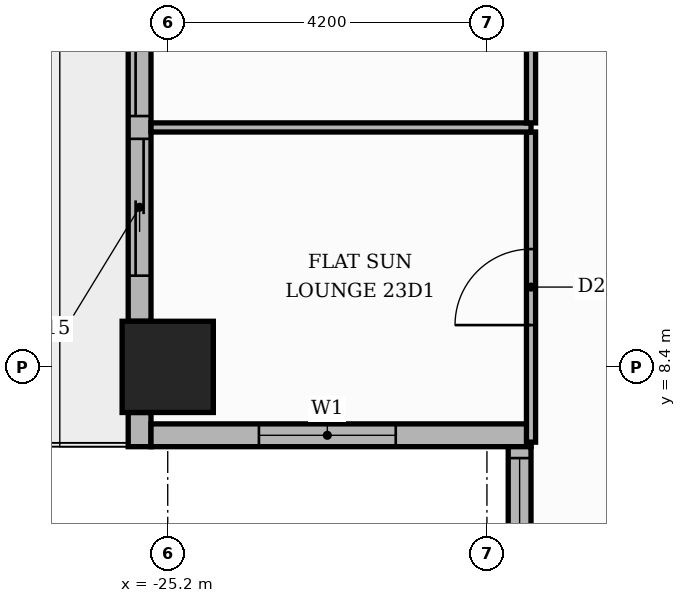
"""IFC4 building model, lengths in metres.
Left out: names, types, materials, properties, quantities, classifications, styles, units other than length and angle.
Written with IfcOpenShell. Run it as: python <this file> out.ifc"""

import sys

from ifc_helpers import new_model, si_unit, direction, frame, frame_2d, origin, origin_2d, place, context, subcontext, project, spatial, rectangle, extrude, element, fill, save


model = new_model("IFC4")
c1 = context("Model", 3, precision=1e-05, world=origin(), true_north=direction((0.0, 1.0)))
c2 = subcontext(c1, "Body", "Model", "MODEL_VIEW")
j1 = project(units=[si_unit("LENGTHUNIT", "METRE"), si_unit("PLANEANGLEUNIT", "RADIAN")], contexts=[c1])
p1 = place(None, origin())
s1 = spatial("IfcSite", under=j1, at=p1, CompositionType="ELEMENT")
p2 = place(p1, origin())
s2 = spatial("IfcBuilding", under=s1, at=p2, CompositionType="ELEMENT")
p3 = place(p2, frame((0.0, 0.0, 98.7)))
s3 = spatial("IfcBuildingStorey", under=s2, at=p3, CompositionType="ELEMENT", Elevation=98.7)
p4 = place(p3, frame((-25.2, 8.4, 0.0), z_axis=(0.0, 0.0, 1.0), x_axis=(1.0, 0.0, 0.0)))
e1 = element("IfcColumn", 1, at=p4, inside=s3, PredefinedType="COLUMN", context=c2, shape_type="SweptSolid", body=[
    extrude(rectangle(XDim=1.2, YDim=1.2, at=origin_2d()), origin(), (0.0, 0.0, 1.0), 3.9),
])
p5 = place(p3, frame((-25.57, 16.2, 0.0), z_axis=(0.0, 0.0, 1.0), x_axis=(0.0, -1.0, 0.0)))
e2 = element("IfcWall", 2, at=p5, inside=s3, PredefinedType="STANDARD", context=c2, shape_type="SweptSolid", body=[
    extrude(rectangle(XDim=7.2, YDim=0.3, at=frame_2d((3.6, 0.0))), origin(), (0.0, 0.0, 1.0), 3.48),
])
p6 = place(p5, frame((0.6, 0.0, 0.0)))
e3 = element("IfcOpeningElement", 3, at=p6, cuts=e2, PredefinedType="OPENING", context=c2, shape_type="SweptSolid", body=[
    extrude(rectangle(XDim=3.9, YDim=2.4, at=frame_2d((1.95, 1.2))), frame((0.0, 0.16, 0.0), z_axis=(0.0, -1.0, 0.0), x_axis=(1.0, 0.0, 0.0)), (0.0, 0.0, 1.0), 0.32),
])
p7 = place(p5, frame((4.8, 0.0, 0.0)))
e4 = element("IfcOpeningElement", 4, at=p7, cuts=e2, PredefinedType="OPENING", context=c2, shape_type="SweptSolid", body=[
    extrude(rectangle(XDim=1.8, YDim=2.4, at=frame_2d((0.9, 1.2))), frame((0.0, 0.16, 0.0), z_axis=(0.0, -1.0, 0.0), x_axis=(1.0, 0.0, 0.0)), (0.0, 0.0, 1.0), 0.32),
])
p8 = place(p3, frame((-25.57, 7.8, 0.0), z_axis=(0.0, 0.0, 1.0), x_axis=(0.0, -1.0, 0.0)))
e5 = element("IfcWall", 5, at=p8, inside=s3, PredefinedType="STANDARD", context=c2, shape_type="SweptSolid", body=[
    extrude(rectangle(XDim=0.45, YDim=0.3, at=frame_2d((0.225, 0.0))), origin(), (0.0, 0.0, 1.0), 3.48),
])
p9 = place(p3, frame((-25.42, 7.5, 0.0), z_axis=(0.0, 0.0, 1.0), x_axis=(1.0, 0.0, 0.0)))
e6 = element("IfcWall", 6, at=p9, inside=s3, PredefinedType="STANDARD", context=c2, shape_type="SweptSolid", body=[
    extrude(rectangle(XDim=5.0, YDim=0.3, at=frame_2d((2.5, 0.0))), origin(), (0.0, 0.0, 1.0), 3.48),
])
p10 = place(p9, frame((1.42, 0.0, 0.9)))
e7 = element("IfcOpeningElement", 7, at=p10, cuts=e6, PredefinedType="OPENING", context=c2, shape_type="SweptSolid", body=[
    extrude(rectangle(XDim=1.8, YDim=2.1, at=frame_2d((0.9, 1.05))), frame((0.0, 0.16, 0.0), z_axis=(0.0, -1.0, 0.0), x_axis=(1.0, 0.0, 0.0)), (0.0, 0.0, 1.0), 0.32),
])
p11 = place(p3, frame((-20.57, 7.35, 0.0), z_axis=(0.0, 0.0, 1.0), x_axis=(0.0, -1.0, 0.0)))
e8 = element("IfcWall", 8, at=p11, inside=s3, PredefinedType="STANDARD", context=c2, shape_type="SweptSolid", body=[
    extrude(rectangle(XDim=15.0, YDim=0.3, at=frame_2d((7.5, 0.0))), origin(), (0.0, 0.0, 1.0), 3.48),
])
p12 = place(p11, frame((0.15, 0.0, 0.9)))
e9 = element("IfcOpeningElement", 9, at=p12, cuts=e8, PredefinedType="OPENING", context=c2, shape_type="SweptSolid", body=[
    extrude(rectangle(XDim=6.0, YDim=2.1, at=frame_2d((3.0, 1.05))), frame((0.0, 0.16, 0.0), z_axis=(0.0, -1.0, 0.0), x_axis=(1.0, 0.0, 0.0)), (0.0, 0.0, 1.0), 0.32),
])
p13 = place(p11, frame((6.45, 0.0, 0.9)))
e10 = element("IfcOpeningElement", 10, at=p13, cuts=e8, PredefinedType="OPENING", context=c2, shape_type="SweptSolid", body=[
    extrude(rectangle(XDim=6.0, YDim=2.1, at=frame_2d((3.0, 1.05))), frame((0.0, 0.16, 0.0), z_axis=(0.0, -1.0, 0.0), x_axis=(1.0, 0.0, 0.0)), (0.0, 0.0, 1.0), 0.32),
])
p14 = place(p11, frame((12.75, 0.0, 0.9)))
e11 = element("IfcOpeningElement", 11, at=p14, cuts=e8, PredefinedType="OPENING", context=c2, shape_type="SweptSolid", body=[
    extrude(rectangle(XDim=1.8, YDim=2.1, at=frame_2d((0.9, 1.05))), frame((0.0, 0.16, 0.0), z_axis=(0.0, -1.0, 0.0), x_axis=(1.0, 0.0, 0.0)), (0.0, 0.0, 1.0), 0.32),
])
p15 = place(p3, frame((-20.42, 7.41, 0.0), z_axis=(0.0, 0.0, 1.0), x_axis=(0.0, 1.0, 0.0)))
e12 = element("IfcWall", 12, at=p15, inside=s3, PredefinedType="PARTITIONING", context=c2, shape_type="SweptSolid", body=[
    extrude(rectangle(XDim=4.08, YDim=0.12, at=frame_2d((2.04, 0.0))), origin(), (0.0, 0.0, 1.0), 3.48),
])
p16 = place(p15, frame((1.54, 0.0, 0.0)))
e13 = element("IfcOpeningElement", 13, at=p16, cuts=e12, PredefinedType="OPENING", context=c2, shape_type="SweptSolid", body=[
    extrude(rectangle(XDim=1.0, YDim=2.1, at=frame_2d((0.5, 1.05))), frame((0.0, 0.07, 0.0), z_axis=(0.0, -1.0, 0.0), x_axis=(1.0, 0.0, 0.0)), (0.0, 0.0, 1.0), 0.14),
])
p17 = place(p3, frame((-25.42, 11.55, 0.0), z_axis=(0.0, 0.0, 1.0), x_axis=(1.0, 0.0, 0.0)))
e14 = element("IfcWall", 14, at=p17, inside=s3, PredefinedType="PARTITIONING", context=c2, shape_type="SweptSolid", body=[
    extrude(rectangle(XDim=5.0, YDim=0.12, at=frame_2d((2.5, 0.0))), origin(), (0.0, 0.0, 1.0), 3.48),
])
p18 = place(p3, frame((-20.42, 11.61, 0.0), z_axis=(0.0, 0.0, 1.0), x_axis=(0.0, 1.0, 0.0)))
e15 = element("IfcWall", 15, at=p18, inside=s3, PredefinedType="PARTITIONING", context=c2, shape_type="SweptSolid", body=[
    extrude(rectangle(XDim=4.08, YDim=0.12, at=frame_2d((2.04, 0.0))), origin(), (0.0, 0.0, 1.0), 3.48),
])
p19 = place(p18, frame((1.54, 0.0, 0.0)))
e16 = element("IfcOpeningElement", 16, at=p19, cuts=e15, PredefinedType="OPENING", context=c2, shape_type="SweptSolid", body=[
    extrude(rectangle(XDim=1.0, YDim=2.1, at=frame_2d((0.5, 1.05))), frame((0.0, 0.07, 0.0), z_axis=(0.0, -1.0, 0.0), x_axis=(1.0, 0.0, 0.0)), (0.0, 0.0, 1.0), 0.14),
])
p20 = place(p6, origin())
e17 = element("IfcDoor", 17, at=p20, inside=s3, OperationType="SLIDING_TO_LEFT", PredefinedType="DOOR", context=c2, shape_type="SweptSolid", body=[
    extrude(rectangle(XDim=3.9, YDim=2.4, at=frame_2d((1.95, 1.2))), frame((0.0, 0.025, 0.0), z_axis=(0.0, -1.0, 0.0), x_axis=(1.0, 0.0, 0.0)), (0.0, 0.0, 1.0), 0.05),
])
fill(e3, e17)
p21 = place(p7, origin())
e18 = element("IfcDoor", 18, at=p21, inside=s3, OperationType="SLIDING_TO_RIGHT", PredefinedType="DOOR", context=c2, shape_type="SweptSolid", body=[
    extrude(rectangle(XDim=1.8, YDim=2.4, at=frame_2d((0.9, 1.2))), frame((0.0, 0.025, 0.0), z_axis=(0.0, -1.0, 0.0), x_axis=(1.0, 0.0, 0.0)), (0.0, 0.0, 1.0), 0.05),
])
fill(e4, e18)
p22 = place(p10, origin())
e19 = element("IfcWindow", 19, at=p22, inside=s3, PartitioningType="SINGLE_PANEL", PredefinedType="WINDOW", context=c2, shape_type="SweptSolid", body=[
    extrude(rectangle(XDim=1.8, YDim=2.1, at=frame_2d((0.9, 1.05))), frame((0.0, 0.03, 0.0), z_axis=(0.0, -1.0, 0.0), x_axis=(1.0, 0.0, 0.0)), (0.0, 0.0, 1.0), 0.06),
])
fill(e7, e19)
p23 = place(p12, origin())
e20 = element("IfcWindow", 20, at=p23, inside=s3, PartitioningType="SINGLE_PANEL", PredefinedType="WINDOW", context=c2, shape_type="SweptSolid", body=[
    extrude(rectangle(XDim=6.0, YDim=2.1, at=frame_2d((3.0, 1.05))), frame((0.0, 0.03, 0.0), z_axis=(0.0, -1.0, 0.0), x_axis=(1.0, 0.0, 0.0)), (0.0, 0.0, 1.0), 0.06),
])
fill(e9, e20)
p24 = place(p16, origin())
e21 = element("IfcDoor", 21, at=p24, inside=s3, OperationType="SINGLE_SWING_LEFT", PredefinedType="DOOR", context=c2, shape_type="SweptSolid", body=[
    extrude(rectangle(XDim=1.0, YDim=2.1, at=frame_2d((0.5, 1.05))), frame((0.0, 0.025, 0.0), z_axis=(0.0, -1.0, 0.0), x_axis=(1.0, 0.0, 0.0)), (0.0, 0.0, 1.0), 0.05),
])
fill(e13, e21)
save(model, sys.argv[1])
